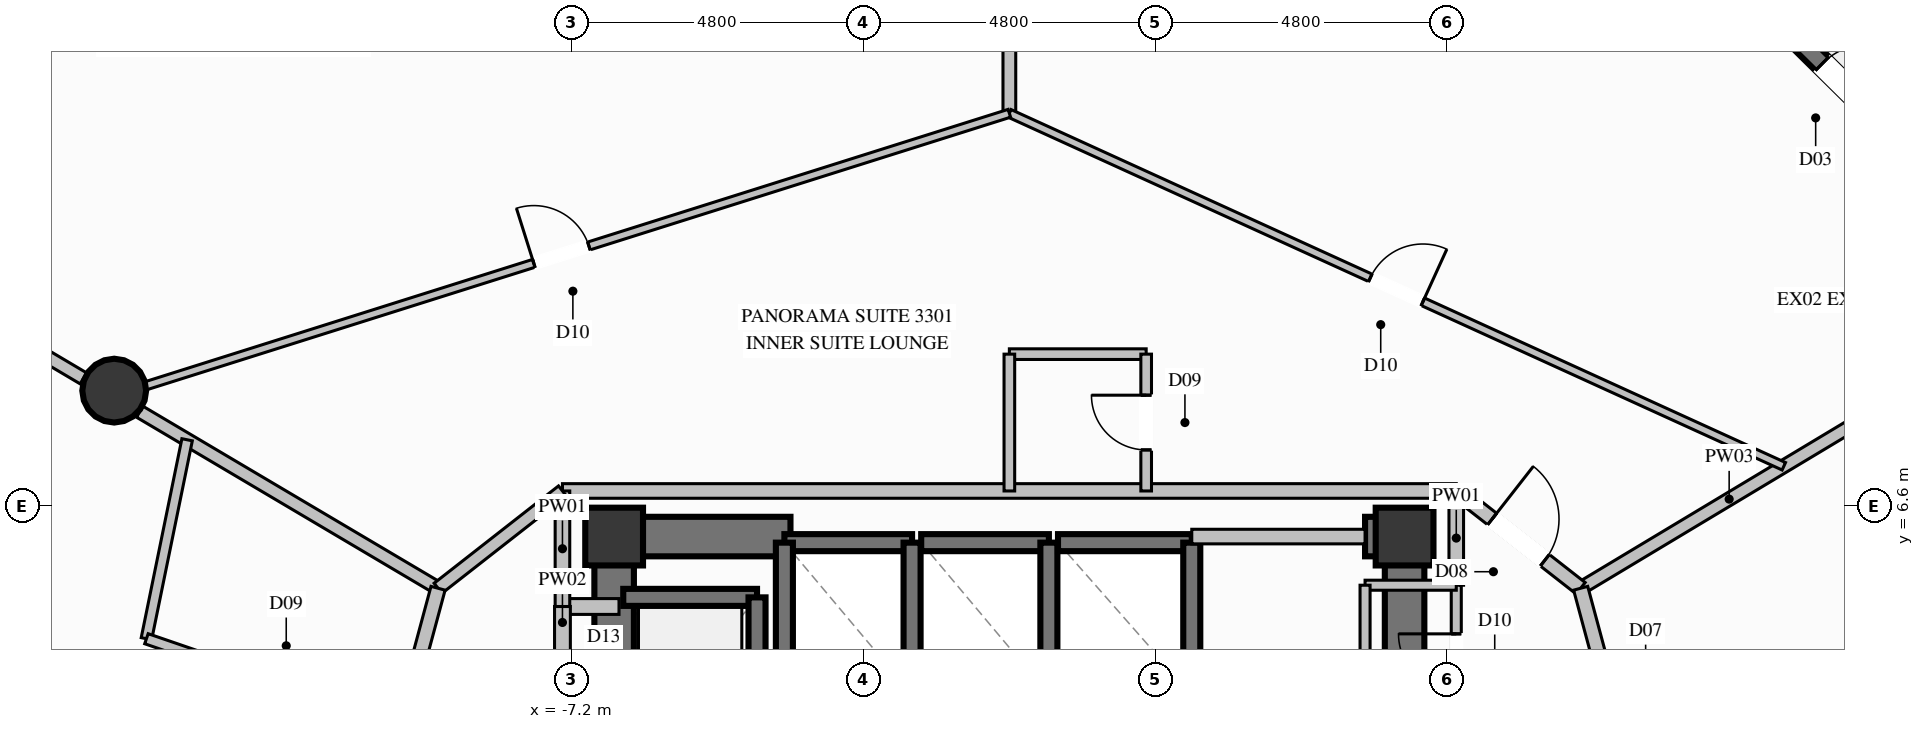
"""IFC4 building model, lengths in metres.
Left out: names, types, materials, properties, quantities, classifications, styles, units other than length and angle.
Written with IfcOpenShell. Run it as: python <this file> out.ifc"""

import sys

from ifc_helpers import new_model, si_unit, direction, frame, frame_2d, origin, origin_2d, place, context, subcontext, project, spatial, rectangle, circle, extrude, element, fill, save


model = new_model("IFC4")
c1 = context("Model", 3, precision=1e-05, world=origin(), true_north=direction((0.0, 1.0)))
c2 = subcontext(c1, "Body", "Model", "MODEL_VIEW")
j1 = project(units=[si_unit("LENGTHUNIT", "METRE"), si_unit("PLANEANGLEUNIT", "RADIAN")], contexts=[c1])
p1 = place(None, origin())
s1 = spatial("IfcSite", under=j1, at=p1, CompositionType="ELEMENT")
p2 = place(p1, origin())
s2 = spatial("IfcBuilding", under=s1, at=p2, CompositionType="ELEMENT")
p3 = place(p2, frame((0.0, 0.0, 124.2)))
s3 = spatial("IfcBuildingStorey", under=s2, at=p3, CompositionType="ELEMENT", Elevation=124.2)
for number, where, z_axis, x_axis in (
    (1, (6.5, 6.1, 0.0), (0.0, 0.0, 1.0), (1.0, 0.0, 0.0)),
    (2, (-6.5, 6.1, 0.0), (0.0, 0.0, 1.0), (1.0, 0.0, 0.0)),
):
    element("IfcColumn", number, at=place(p3, frame(where, z_axis=z_axis, x_axis=x_axis)), inside=s3, PredefinedType="COLUMN", context=c2, shape_type="SweptSolid", body=[
        extrude(rectangle(XDim=0.95, YDim=0.95, at=origin_2d()), origin(), (0.0, 0.0, 1.0), 3.6),
    ])
p4 = place(p3, frame((-6.175, 6.1, 0.0), z_axis=(0.0, 0.0, 1.0), x_axis=(1.0, 0.0, 0.0)))
e3 = element("IfcWall", 3, at=p4, inside=s3, PredefinedType="SHEAR", context=c2, shape_type="SweptSolid", body=[
    extrude(rectangle(XDim=2.575, YDim=0.65, at=frame_2d((1.288, 0.0))), origin(), (0.0, 0.0, 1.0), 3.6),
])
p5 = place(p3, frame((5.85, 6.1, 0.0), z_axis=(0.0, 0.0, 1.0), x_axis=(1.0, 0.0, 0.0)))
e4 = element("IfcWall", 4, at=p5, inside=s3, PredefinedType="SHEAR", context=c2, shape_type="SweptSolid", body=[
    extrude(rectangle(XDim=0.325, YDim=0.65, at=frame_2d((0.163, 0.0))), origin(), (0.0, 0.0, 1.0), 3.6),
])
p6 = place(p3, frame((-6.5, 2.35, 0.0), z_axis=(0.0, 0.0, 1.0), x_axis=(0.0, 1.0, 0.0)))
e5 = element("IfcWall", 5, at=p6, inside=s3, PredefinedType="SHEAR", context=c2, shape_type="SweptSolid", body=[
    extrude(rectangle(XDim=4.075, YDim=0.65, at=frame_2d((2.038, 0.0))), origin(), (0.0, 0.0, 1.0), 3.6),
])
p7 = place(p3, frame((6.5, 3.35, 0.0), z_axis=(0.0, 0.0, 1.0), x_axis=(0.0, 1.0, 0.0)))
e6 = element("IfcWall", 6, at=p7, inside=s3, PredefinedType="SHEAR", context=c2, shape_type="SweptSolid", body=[
    extrude(rectangle(XDim=3.075, YDim=0.65, at=frame_2d((1.538, 0.0))), origin(), (0.0, 0.0, 1.0), 3.6),
])
p8 = place(p3, frame((-14.722, 8.5, 0.0), z_axis=(0.0, 0.0, 1.0), x_axis=(1.0, 0.0, 0.0)))
e7 = element("IfcColumn", 7, at=p8, inside=s3, PredefinedType="COLUMN", context=c2, shape_type="SweptSolid", body=[
    extrude(circle(Radius=0.525, at=origin_2d()), origin(), (0.0, 0.0, 1.0), 3.6),
])
p9 = place(p3, frame((11.071, 16.147, 0.0), z_axis=(0.0, 0.0, 1.0), x_axis=(0.711325125038, -0.702863120735, 0.0)))
e8 = element("IfcWall", 8, at=p9, inside=s3, PredefinedType="SOLIDWALL", context=c2, shape_type="SweptSolid", body=[
    extrude(rectangle(XDim=7.559, YDim=0.32, at=frame_2d((3.78, 0.0))), origin(), (0.0, 0.0, 1.0), 3.35),
])
p10 = place(p9, frame((0.69, 0.0, 0.35)))
e9 = element("IfcOpeningElement", 9, at=p10, cuts=e8, PredefinedType="OPENING", context=c2, shape_type="SweptSolid", body=[
    extrude(rectangle(XDim=1.8, YDim=2.6, at=frame_2d((0.9, 1.3))), frame((0.0, 0.17, 0.0), z_axis=(0.0, -1.0, 0.0), x_axis=(1.0, 0.0, 0.0)), (0.0, 0.0, 1.0), 0.34),
])
p11 = place(p9, frame((3.23, 0.0, 0.0)))
e10 = element("IfcOpeningElement", 10, at=p11, cuts=e8, PredefinedType="OPENING", context=c2, shape_type="SweptSolid", body=[
    extrude(rectangle(XDim=1.1, YDim=2.2, at=frame_2d((0.55, 1.1))), frame((0.0, 0.17, 0.0), z_axis=(0.0, -1.0, 0.0), x_axis=(1.0, 0.0, 0.0)), (0.0, 0.0, 1.0), 0.34),
])
p12 = place(p3, frame((-1.6, 6.0, 0.0), z_axis=(0.0, 0.0, 1.0), x_axis=(-1.0, 0.0, 0.0)))
e11 = element("IfcWall", 11, at=p12, inside=s3, PredefinedType="SOLIDWALL", context=c2, shape_type="SweptSolid", body=[
    extrude(rectangle(XDim=2.1, YDim=0.28, at=frame_2d((1.05, 0.0))), origin(), (0.0, 0.0, 1.0), 3.35),
])
for number, where, z_axis, x_axis in (
    (12, (-3.7, 6.0, 0.0), (0.0, 0.0, 1.0), (0.0, -1.0, 0.0)),
    (13, (-1.6, 3.5, 0.0), (0.0, 0.0, 1.0), (0.0, 1.0, 0.0)),
):
    element("IfcWall", number, at=place(p3, frame(where, z_axis=z_axis, x_axis=x_axis)), inside=s3, PredefinedType="SOLIDWALL", context=c2, shape_type="SweptSolid", body=[
        extrude(rectangle(XDim=2.5, YDim=0.28, at=frame_2d((1.25, 0.0))), origin(), (0.0, 0.0, 1.0), 3.35),
    ])
p13 = place(p3, frame((0.65, 6.0, 0.0), z_axis=(0.0, 0.0, 1.0), x_axis=(-1.0, 0.0, 0.0)))
e14 = element("IfcWall", 14, at=p13, inside=s3, PredefinedType="SOLIDWALL", context=c2, shape_type="SweptSolid", body=[
    extrude(rectangle(XDim=2.1, YDim=0.28, at=frame_2d((1.05, 0.0))), origin(), (0.0, 0.0, 1.0), 3.35),
])
p14 = place(p3, frame((0.65, 3.5, 0.0), z_axis=(0.0, 0.0, 1.0), x_axis=(0.0, 1.0, 0.0)))
e15 = element("IfcWall", 15, at=p14, inside=s3, PredefinedType="SOLIDWALL", context=c2, shape_type="SweptSolid", body=[
    extrude(rectangle(XDim=2.5, YDim=0.28, at=frame_2d((1.25, 0.0))), origin(), (0.0, 0.0, 1.0), 3.35),
])
p15 = place(p3, frame((3.0, 6.0, 0.0), z_axis=(0.0, 0.0, 1.0), x_axis=(-1.0, 0.0, 0.0)))
e16 = element("IfcWall", 16, at=p15, inside=s3, PredefinedType="SOLIDWALL", context=c2, shape_type="SweptSolid", body=[
    extrude(rectangle(XDim=2.2, YDim=0.28, at=frame_2d((1.1, 0.0))), origin(), (0.0, 0.0, 1.0), 3.35),
])
p16 = place(p3, frame((3.0, 3.5, 0.0), z_axis=(0.0, 0.0, 1.0), x_axis=(0.0, 1.0, 0.0)))
e17 = element("IfcWall", 17, at=p16, inside=s3, PredefinedType="SOLIDWALL", context=c2, shape_type="SweptSolid", body=[
    extrude(rectangle(XDim=2.5, YDim=0.28, at=frame_2d((1.25, 0.0))), origin(), (0.0, 0.0, 1.0), 3.35),
])
p17 = place(p3, frame((-4.15, 5.1, 0.0), z_axis=(0.0, 0.0, 1.0), x_axis=(-1.0, 0.0, 0.0)))
e18 = element("IfcWall", 18, at=p17, inside=s3, PredefinedType="SOLIDWALL", context=c2, shape_type="SweptSolid", body=[
    extrude(rectangle(XDim=2.2, YDim=0.28, at=frame_2d((1.1, 0.0))), origin(), (0.0, 0.0, 1.0), 3.35),
])
p18 = place(p3, frame((-4.15, 2.4, 0.0), z_axis=(0.0, 0.0, 1.0), x_axis=(0.0, 1.0, 0.0)))
e19 = element("IfcWall", 19, at=p18, inside=s3, PredefinedType="SOLIDWALL", context=c2, shape_type="SweptSolid", body=[
    extrude(rectangle(XDim=2.7, YDim=0.28, at=frame_2d((1.35, 0.0))), origin(), (0.0, 0.0, 1.0), 3.35),
])
p19 = place(p3, frame((-7.35, 4.95, 0.0), z_axis=(0.0, 0.0, 1.0), x_axis=(1.0, 0.0, 0.0)))
e20 = element("IfcWall", 20, at=p19, inside=s3, PredefinedType="PARTITIONING", context=c2, shape_type="SweptSolid", body=[
    extrude(rectangle(XDim=0.93, YDim=0.26, at=frame_2d((0.465, 0.0))), origin(), (0.0, 0.0, 1.0), 3.35),
])
p20 = place(p3, frame((-7.35, 2.55, 0.0), z_axis=(0.0, 0.0, 1.0), x_axis=(0.0, 1.0, 0.0)))
e21 = element("IfcWall", 21, at=p20, inside=s3, PredefinedType="PARTITIONING", context=c2, shape_type="SweptSolid", body=[
    extrude(rectangle(XDim=2.4, YDim=0.26, at=frame_2d((1.2, 0.0))), origin(), (0.0, 0.0, 1.0), 2.435),
])
p21 = place(p20, frame((0.775, 0.0, 0.0)))
e22 = element("IfcOpeningElement", 22, at=p21, cuts=e21, PredefinedType="OPENING", context=c2, shape_type="SweptSolid", body=[
    extrude(rectangle(XDim=0.85, YDim=2.05, at=frame_2d((0.425, 1.025))), frame((0.0, 0.14, 0.0), z_axis=(0.0, -1.0, 0.0), x_axis=(1.0, 0.0, 0.0)), (0.0, 0.0, 1.0), 0.28),
])
p22 = place(p3, frame((-7.35, 6.85, 0.0), z_axis=(0.0, 0.0, 1.0), x_axis=(1.0, 0.0, 0.0)))
e23 = element("IfcWall", 23, at=p22, inside=s3, PredefinedType="PARTITIONING", context=c2, shape_type="SweptSolid", body=[
    extrude(rectangle(XDim=14.7, YDim=0.24, at=frame_2d((7.35, 0.0))), origin(), (0.0, 0.0, 1.0), 2.435),
])
p23 = place(p3, frame((-7.35, 4.95, 0.0), z_axis=(0.0, 0.0, 1.0), x_axis=(0.0, 1.0, 0.0)))
e24 = element("IfcWall", 24, at=p23, inside=s3, PredefinedType="PARTITIONING", context=c2, shape_type="SweptSolid", body=[
    extrude(rectangle(XDim=1.9, YDim=0.24, at=frame_2d((0.95, 0.0))), origin(), (0.0, 0.0, 1.0), 2.435),
])
p24 = place(p3, frame((7.35, 5.3, 0.0), z_axis=(0.0, 0.0, 1.0), x_axis=(0.0, 1.0, 0.0)))
e25 = element("IfcWall", 25, at=p24, inside=s3, PredefinedType="PARTITIONING", context=c2, shape_type="SweptSolid", body=[
    extrude(rectangle(XDim=1.55, YDim=0.24, at=frame_2d((0.775, 0.0))), origin(), (0.0, 0.0, 1.0), 2.435),
])
p25 = place(p3, frame((3.0, 6.1, 0.0), z_axis=(0.0, 0.0, 1.0), x_axis=(1.0, 0.0, 0.0)))
e26 = element("IfcWall", 26, at=p25, inside=s3, PredefinedType="PARTITIONING", context=c2, shape_type="SweptSolid", body=[
    extrude(rectangle(XDim=2.85, YDim=0.24, at=frame_2d((1.425, 0.0))), origin(), (0.0, 0.0, 1.0), 2.435),
])
p26 = place(p3, frame((7.35, 2.75, 0.0), z_axis=(0.0, 0.0, 1.0), x_axis=(0.0, 1.0, 0.0)))
e27 = element("IfcWall", 27, at=p26, inside=s3, PredefinedType="PARTITIONING", context=c2, shape_type="SweptSolid", body=[
    extrude(rectangle(XDim=2.55, YDim=0.165, at=frame_2d((1.275, 0.0))), origin(), (0.0, 0.0, 1.0), 3.35),
])
p27 = place(p26, frame((0.8, 0.0, 0.0)))
e28 = element("IfcOpeningElement", 28, at=p27, cuts=e27, PredefinedType="OPENING", context=c2, shape_type="SweptSolid", body=[
    extrude(rectangle(XDim=0.95, YDim=2.1, at=frame_2d((0.475, 1.05))), frame((0.0, 0.093, 0.0), z_axis=(0.0, -1.0, 0.0), x_axis=(1.0, 0.0, 0.0)), (0.0, 0.0, 1.0), 0.185),
])
p28 = place(p3, frame((7.35, 5.3, 0.0), z_axis=(0.0, 0.0, 1.0), x_axis=(-1.0, 0.0, 0.0)))
e29 = element("IfcWall", 29, at=p28, inside=s3, PredefinedType="PARTITIONING", context=c2, shape_type="SweptSolid", body=[
    extrude(rectangle(XDim=1.5, YDim=0.165, at=frame_2d((0.75, 0.0))), origin(), (0.0, 0.0, 1.0), 2.435),
])
p29 = place(p3, frame((5.85, 5.3, 0.0), z_axis=(0.0, 0.0, 1.0), x_axis=(0.0, -1.0, 0.0)))
e30 = element("IfcWall", 30, at=p29, inside=s3, PredefinedType="PARTITIONING", context=c2, shape_type="SweptSolid", body=[
    extrude(rectangle(XDim=2.55, YDim=0.165, at=frame_2d((1.275, 0.0))), origin(), (0.0, 0.0, 1.0), 2.435),
])
p30 = place(p3, frame((9.396, 5.25, 0.0), z_axis=(0.0, 0.0, 1.0), x_axis=(0.857379456535, 0.514684823471, 0.0)))
e31 = element("IfcWall", 31, at=p30, inside=s3, PredefinedType="PARTITIONING", context=c2, shape_type="SweptSolid", body=[
    extrude(rectangle(XDim=5.697, YDim=0.21, at=frame_2d((2.848, 0.0))), origin(), (0.0, 0.0, 1.0), 2.791),
])
p31 = place(p3, frame((-9.396, 5.25, 0.0), z_axis=(0.0, 0.0, 1.0), x_axis=(-0.860613457584, 0.509258752134, 0.0)))
e32 = element("IfcWall", 32, at=p31, inside=s3, PredefinedType="PARTITIONING", context=c2, shape_type="SweptSolid", body=[
    extrude(rectangle(XDim=5.701, YDim=0.21, at=frame_2d((2.85, 0.0))), origin(), (0.0, 0.0, 1.0), 2.791),
])
p32 = place(p3, frame((-15.228, 8.701, 0.0), z_axis=(0.0, 0.0, 1.0), x_axis=(-0.860570126037, 0.509331972462, 0.0)))
e33 = element("IfcWall", 33, at=p32, inside=s3, PredefinedType="PARTITIONING", context=c2, shape_type="SweptSolid", body=[
    extrude(rectangle(XDim=7.328, YDim=0.21, at=frame_2d((3.664, 0.0))), origin(), (0.0, 0.0, 1.0), 3.35),
])
for number, where, z_axis, x_axis in (
    (34, (0.0, 9.1, 0.0), (0.0, 0.0, 1.0), (1.0, 0.0, 0.0)),
    (35, (0.0, 9.1, 0.0), (0.0, 0.0, 1.0), (0.0, -1.0, 0.0)),
):
    element("IfcWall", number, at=place(p3, frame(where, z_axis=z_axis, x_axis=x_axis)), inside=s3, PredefinedType="PLUMBINGWALL", context=c2, shape_type="SweptSolid", body=[
        extrude(rectangle(XDim=2.25, YDim=0.175, at=frame_2d((1.125, 0.0))), origin(), (0.0, 0.0, 1.0), 3.35),
    ])
p33 = place(p3, frame((2.25, 6.85, 0.0), z_axis=(0.0, 0.0, 1.0), x_axis=(0.0, 1.0, 0.0)))
e36 = element("IfcWall", 36, at=p33, inside=s3, PredefinedType="PLUMBINGWALL", context=c2, shape_type="SweptSolid", body=[
    extrude(rectangle(XDim=2.25, YDim=0.175, at=frame_2d((1.125, 0.0))), origin(), (0.0, 0.0, 1.0), 3.35),
])
p34 = place(p33, frame((0.675, 0.0, 0.0)))
e37 = element("IfcOpeningElement", 37, at=p34, cuts=e36, PredefinedType="OPENING", context=c2, shape_type="SweptSolid", body=[
    extrude(rectangle(XDim=0.9, YDim=2.1, at=frame_2d((0.45, 1.05))), frame((0.0, 0.098, 0.0), z_axis=(0.0, -1.0, 0.0), x_axis=(1.0, 0.0, 0.0)), (0.0, 0.0, 1.0), 0.195),
])
p35 = place(p3, frame((-9.396, 5.25, 0.0), z_axis=(0.0, 0.0, 1.0), x_axis=(0.7876993483, 0.6160598483, 0.0)))
e38 = element("IfcWall", 38, at=p35, inside=s3, PredefinedType="PARTITIONING", context=c2, shape_type="SweptSolid", body=[
    extrude(rectangle(XDim=2.597, YDim=0.21, at=frame_2d((1.299, 0.0))), origin(), (0.0, 0.0, 1.0), 3.35),
])
p36 = place(p3, frame((7.35, 6.85, 0.0), z_axis=(0.0, 0.0, 1.0), x_axis=(0.7876993483, -0.6160598483, 0.0)))
e39 = element("IfcWall", 39, at=p36, inside=s3, PredefinedType="PARTITIONING", context=c2, shape_type="SweptSolid", body=[
    extrude(rectangle(XDim=2.597, YDim=0.24, at=frame_2d((1.299, 0.0))), origin(), (0.0, 0.0, 1.0), 3.35),
])
p37 = place(p36, frame((0.749, 0.0, 0.0)))
e40 = element("IfcOpeningElement", 40, at=p37, cuts=e39, PredefinedType="OPENING", context=c2, shape_type="SweptSolid", body=[
    extrude(rectangle(XDim=1.1, YDim=2.3, at=frame_2d((0.55, 1.15))), frame((0.0, 0.13, 0.0), z_axis=(0.0, -1.0, 0.0), x_axis=(1.0, 0.0, 0.0)), (0.0, 0.0, 1.0), 0.26),
])
p38 = place(p3, frame((0.0, 13.061, 0.0), z_axis=(0.0, 0.0, 1.0), x_axis=(0.0, 1.0, 0.0)))
e41 = element("IfcWall", 41, at=p38, inside=s3, PredefinedType="PARTITIONING", context=c2, shape_type="SweptSolid", body=[
    extrude(rectangle(XDim=3.394, YDim=0.21, at=frame_2d((1.697, 0.0))), origin(), (0.0, 0.0, 1.0), 3.35),
])
p39 = place(p3, frame((0.0, 13.061, 0.0), z_axis=(0.0, 0.0, 1.0), x_axis=(0.909952678095, -0.414712097277, 0.0)))
e42 = element("IfcWall", 42, at=p39, inside=s3, PredefinedType="PARTITIONING", context=c2, shape_type="SweptSolid", body=[
    extrude(rectangle(XDim=13.998, YDim=0.135, at=frame_2d((6.999, 0.0))), origin(), (0.0, 0.0, 1.0), 3.35),
])
p40 = place(p39, frame((6.524, 0.0, 0.0)))
e43 = element("IfcOpeningElement", 43, at=p40, cuts=e42, PredefinedType="OPENING", context=c2, shape_type="SweptSolid", body=[
    extrude(rectangle(XDim=0.95, YDim=2.1, at=frame_2d((0.475, 1.05))), frame((0.0, 0.078, 0.0), z_axis=(0.0, -1.0, 0.0), x_axis=(1.0, 0.0, 0.0)), (0.0, 0.0, 1.0), 0.155),
])
p41 = place(p3, frame((-14.737, 8.411, 0.0), z_axis=(0.0, 0.0, 1.0), x_axis=(0.953650690157, 0.300915870573, 0.0)))
e44 = element("IfcWall", 44, at=p41, inside=s3, PredefinedType="PARTITIONING", context=c2, shape_type="SweptSolid", body=[
    extrude(rectangle(XDim=15.453, YDim=0.135, at=frame_2d((7.727, 0.0))), origin(), (0.0, 0.0, 1.0), 2.879),
])
p42 = place(p41, frame((7.252, 0.0, 0.0)))
e45 = element("IfcOpeningElement", 45, at=p42, cuts=e44, PredefinedType="OPENING", context=c2, shape_type="SweptSolid", body=[
    extrude(rectangle(XDim=0.95, YDim=2.1, at=frame_2d((0.475, 1.05))), frame((0.0, 0.078, 0.0), z_axis=(0.0, -1.0, 0.0), x_axis=(1.0, 0.0, 0.0)), (0.0, 0.0, 1.0), 0.155),
])
p43 = place(p3, frame((-9.396, 5.25, 0.0), z_axis=(0.0, 0.0, 1.0), x_axis=(-0.260152382661, -0.965567572879, 0.0)))
e46 = element("IfcWall", 46, at=p43, inside=s3, PredefinedType="PARTITIONING", context=c2, shape_type="SweptSolid", body=[
    extrude(rectangle(XDim=2.349, YDim=0.24, at=frame_2d((1.174, 0.0))), origin(), (0.0, 0.0, 1.0), 3.35),
])
p44 = place(p3, frame((-13.523, 7.692, 0.0), z_axis=(0.0, 0.0, 1.0), x_axis=(-0.200303741318, -0.979733847131, 0.0)))
e47 = element("IfcWall", 47, at=p44, inside=s3, PredefinedType="PLUMBINGWALL", context=c2, shape_type="SweptSolid", body=[
    extrude(rectangle(XDim=3.34, YDim=0.175, at=frame_2d((1.67, 0.0))), origin(), (0.0, 0.0, 1.0), 3.35),
])
p45 = place(p3, frame((-10.007, 2.982, 0.0), z_axis=(0.0, 0.0, 1.0), x_axis=(-0.945724226407, 0.324970287237, 0.0)))
e48 = element("IfcWall", 48, at=p45, inside=s3, PredefinedType="PLUMBINGWALL", context=c2, shape_type="SweptSolid", body=[
    extrude(rectangle(XDim=4.425, YDim=0.175, at=frame_2d((2.212, 0.0))), origin(), (0.0, 0.0, 1.0), 3.35),
])
p46 = place(p45, frame((1.763, 0.0, 0.0)))
e49 = element("IfcOpeningElement", 49, at=p46, cuts=e48, PredefinedType="OPENING", context=c2, shape_type="SweptSolid", body=[
    extrude(rectangle(XDim=0.9, YDim=2.1, at=frame_2d((0.45, 1.05))), frame((0.0, 0.098, 0.0), z_axis=(0.0, -1.0, 0.0), x_axis=(1.0, 0.0, 0.0)), (0.0, 0.0, 1.0), 0.195),
])
p47 = place(p3, frame((10.239, 2.118, 0.0), z_axis=(0.0, 0.0, 1.0), x_axis=(-0.259905989708, 0.965633924691, 0.0)))
e50 = element("IfcWall", 50, at=p47, inside=s3, PredefinedType="PARTITIONING", context=c2, shape_type="SweptSolid", body=[
    extrude(rectangle(XDim=3.244, YDim=0.24, at=frame_2d((1.622, 0.0))), origin(), (0.0, 0.0, 1.0), 3.35),
])
p48 = place(p47, frame((1.122, 0.0, 0.0)))
e51 = element("IfcOpeningElement", 51, at=p48, cuts=e50, PredefinedType="OPENING", context=c2, shape_type="SweptSolid", body=[
    extrude(rectangle(XDim=1.0, YDim=2.2, at=frame_2d((0.5, 1.1))), frame((0.0, 0.13, 0.0), z_axis=(0.0, -1.0, 0.0), x_axis=(1.0, 0.0, 0.0)), (0.0, 0.0, 1.0), 0.26),
])
p49 = place(p11, origin())
e52 = element("IfcDoor", 52, at=p49, inside=s3, OperationType="SINGLE_SWING_RIGHT", PredefinedType="DOOR", context=c2, shape_type="SweptSolid", body=[
    extrude(rectangle(XDim=1.1, YDim=2.2, at=frame_2d((0.55, 1.1))), frame((0.0, 0.025, 0.0), z_axis=(0.0, -1.0, 0.0), x_axis=(1.0, 0.0, 0.0)), (0.0, 0.0, 1.0), 0.05),
])
fill(e10, e52)
p50 = place(p27, origin())
e53 = element("IfcDoor", 53, at=p50, inside=s3, OperationType="SINGLE_SWING_RIGHT", PredefinedType="DOOR", context=c2, shape_type="SweptSolid", body=[
    extrude(rectangle(XDim=0.95, YDim=2.1, at=frame_2d((0.475, 1.05))), frame((0.0, 0.025, 0.0), z_axis=(0.0, -1.0, 0.0), x_axis=(1.0, 0.0, 0.0)), (0.0, 0.0, 1.0), 0.05),
])
fill(e28, e53)
p51 = place(p34, origin())
e54 = element("IfcDoor", 54, at=p51, inside=s3, OperationType="SINGLE_SWING_RIGHT", PredefinedType="DOOR", context=c2, shape_type="SweptSolid", body=[
    extrude(rectangle(XDim=0.9, YDim=2.1, at=frame_2d((0.45, 1.05))), frame((0.0, 0.025, 0.0), z_axis=(0.0, -1.0, 0.0), x_axis=(1.0, 0.0, 0.0)), (0.0, 0.0, 1.0), 0.05),
])
fill(e37, e54)
p52 = place(p37, origin())
e55 = element("IfcDoor", 55, at=p52, inside=s3, OperationType="SINGLE_SWING_LEFT", PredefinedType="DOOR", context=c2, shape_type="SweptSolid", body=[
    extrude(rectangle(XDim=1.1, YDim=2.3, at=frame_2d((0.55, 1.15))), frame((0.0, 0.025, 0.0), z_axis=(0.0, -1.0, 0.0), x_axis=(1.0, 0.0, 0.0)), (0.0, 0.0, 1.0), 0.05),
])
fill(e40, e55)
p53 = place(p40, origin())
e56 = element("IfcDoor", 56, at=p53, inside=s3, OperationType="SINGLE_SWING_RIGHT", PredefinedType="DOOR", context=c2, shape_type="SweptSolid", body=[
    extrude(rectangle(XDim=0.95, YDim=2.1, at=frame_2d((0.475, 1.05))), frame((0.0, 0.025, 0.0), z_axis=(0.0, -1.0, 0.0), x_axis=(1.0, 0.0, 0.0)), (0.0, 0.0, 1.0), 0.05),
])
fill(e43, e56)
p54 = place(p42, origin())
e57 = element("IfcDoor", 57, at=p54, inside=s3, OperationType="SINGLE_SWING_LEFT", PredefinedType="DOOR", context=c2, shape_type="SweptSolid", body=[
    extrude(rectangle(XDim=0.95, YDim=2.1, at=frame_2d((0.475, 1.05))), frame((0.0, 0.025, 0.0), z_axis=(0.0, -1.0, 0.0), x_axis=(1.0, 0.0, 0.0)), (0.0, 0.0, 1.0), 0.05),
])
fill(e45, e57)
save(model, sys.argv[1])
